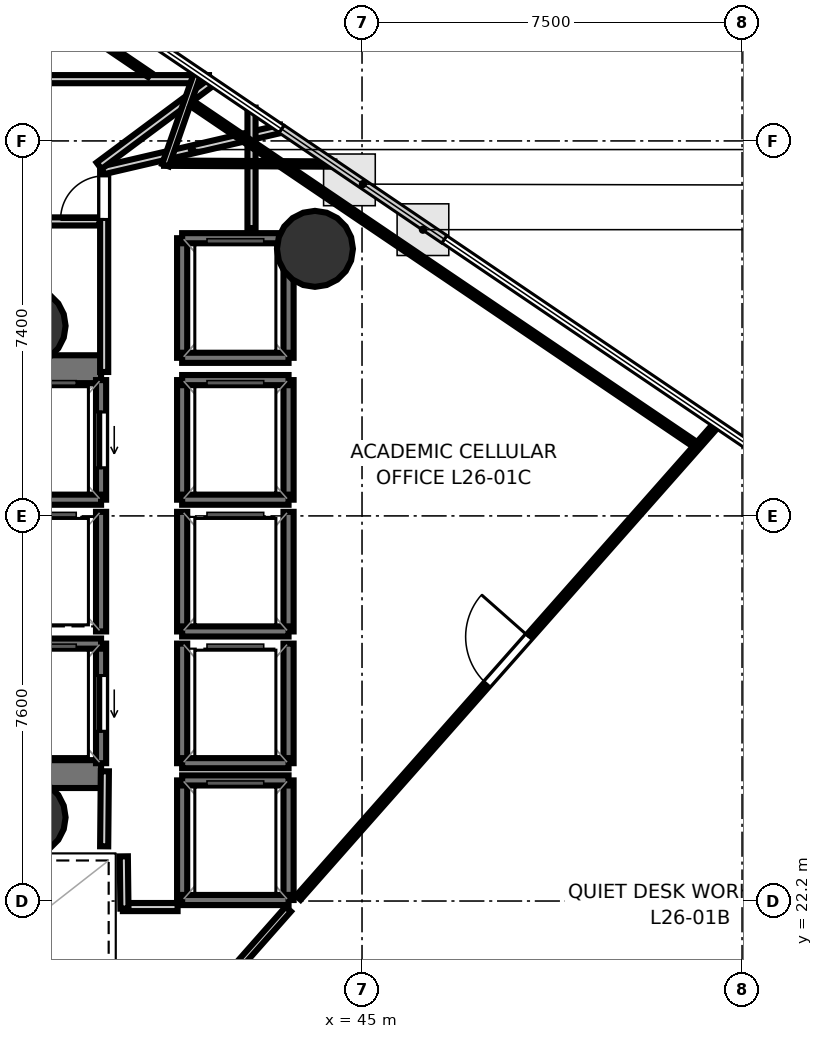
"""IFC4 building model, lengths in metres.
Left out: names, types, materials, properties, quantities, classifications, styles, units other than length and angle.
Written with IfcOpenShell. Run it as: python <this file> out.ifc"""

import sys

from ifc_helpers import new_model, si_unit, direction, frame, frame_2d, origin, origin_2d, place, context, subcontext, project, spatial, rectangle, hollow_circle, extrude, element, fill, save


model = new_model("IFC4")
c1 = context("Model", 3, precision=1e-05, world=origin(), true_north=direction((0.0, 1.0)))
c2 = subcontext(c1, "Body", "Model", "MODEL_VIEW")
j1 = project(units=[si_unit("LENGTHUNIT", "METRE"), si_unit("PLANEANGLEUNIT", "RADIAN")], contexts=[c1])
p1 = place(None, origin())
s1 = spatial("IfcSite", under=j1, at=p1, CompositionType="ELEMENT")
p2 = place(p1, origin())
s2 = spatial("IfcBuilding", under=s1, at=p2, CompositionType="ELEMENT")
p3 = place(p2, frame((0.0, 0.0, 105.2)))
s3 = spatial("IfcBuildingStorey", under=s2, at=p3, CompositionType="ELEMENT", Elevation=105.2)
p4 = place(p3, frame((29.23, 32.695, 0.0), z_axis=(0.0, 0.0, 1.0), x_axis=(1.0, 0.0, 0.0)))
e1 = element("IfcWall", 1, at=p4, inside=s3, PredefinedType="SHEAR", context=c2, shape_type="SweptSolid", body=[
    extrude(rectangle(XDim=10.62, YDim=0.55, at=frame_2d((5.31, 0.0))), origin(), (0.0, 0.0, 1.0), 3.52),
])
p5 = place(p4, frame((0.995, 0.0, 0.0)))
e2 = element("IfcOpeningElement", 2, at=p5, cuts=e1, PredefinedType="OPENING", context=c2, shape_type="SweptSolid", body=[
    extrude(rectangle(XDim=1.25, YDim=2.15, at=frame_2d((0.625, 1.075))), frame((0.0, 0.285, 0.0), z_axis=(0.0, -1.0, 0.0), x_axis=(1.0, 0.0, 0.0)), (0.0, 0.0, 1.0), 0.57),
])
p6 = place(p3, frame((29.23, 24.705, 0.0), z_axis=(0.0, 0.0, 1.0), x_axis=(1.0, 0.0, 0.0)))
e3 = element("IfcWall", 3, at=p6, inside=s3, PredefinedType="SHEAR", context=c2, shape_type="SweptSolid", body=[
    extrude(rectangle(XDim=10.62, YDim=0.55, at=frame_2d((5.31, 0.0))), origin(), (0.0, 0.0, 1.0), 3.52),
])
p7 = place(p6, frame((0.795, 0.0, 0.0)))
e4 = element("IfcOpeningElement", 4, at=p7, cuts=e3, PredefinedType="OPENING", context=c2, shape_type="SweptSolid", body=[
    extrude(rectangle(XDim=1.25, YDim=2.15, at=frame_2d((0.625, 1.075))), frame((0.0, 0.285, 0.0), z_axis=(0.0, -1.0, 0.0), x_axis=(1.0, 0.0, 0.0)), (0.0, 0.0, 1.0), 0.57),
])
for number, where, z_axis, x_axis in (
    (5, (38.4, 33.55, 0.0), (0.0, 0.0, 1.0), (1.0, 0.0, 0.0)),
    (6, (38.4, 23.85, 0.0), (0.0, 0.0, 1.0), (1.0, 0.0, 0.0)),
    (7, (44.071, 35.07, 0.0), (0.0, 0.0, 1.0), (1.0, 0.0, 0.0)),
):
    element("IfcColumn", number, at=place(p3, frame(where, z_axis=z_axis, x_axis=x_axis)), inside=s3, PredefinedType="COLUMN", context=c2, shape_type="SweptSolid", body=[
        extrude(hollow_circle(Radius=0.75, WallThickness=0.036, at=origin_2d()), origin(), (0.0, 0.0, 1.0), 3.7),
    ])
p8 = place(p3, frame((39.85, 30.12, 0.0), z_axis=(0.0, 0.0, 1.0), x_axis=(0.0, 1.0, 0.0)))
e8 = element("IfcWall", 8, at=p8, inside=s3, PredefinedType="SOLIDWALL", context=c2, shape_type="SweptSolid", body=[
    extrude(rectangle(XDim=2.36, YDim=0.2, at=frame_2d((1.18, 0.0))), origin(), (0.0, 0.0, 1.0), 3.52),
])
p9 = place(p8, frame((0.63, 0.0, 0.0)))
e9 = element("IfcOpeningElement", 9, at=p9, cuts=e8, PredefinedType="OPENING", context=c2, shape_type="SweptSolid", body=[
    extrude(rectangle(XDim=1.1, YDim=2.15, at=frame_2d((0.55, 1.075))), frame((0.0, 0.11, 0.0), z_axis=(0.0, -1.0, 0.0), x_axis=(1.0, 0.0, 0.0)), (0.0, 0.0, 1.0), 0.22),
])
p10 = place(p3, frame((37.75, 30.12, 0.0), z_axis=(0.0, 0.0, 1.0), x_axis=(1.0, 0.0, 0.0)))
e10 = element("IfcWall", 10, at=p10, inside=s3, PredefinedType="SOLIDWALL", context=c2, shape_type="SweptSolid", body=[
    extrude(rectangle(XDim=2.1, YDim=0.2, at=frame_2d((1.05, 0.0))), origin(), (0.0, 0.0, 1.0), 3.52),
])
p11 = place(p3, frame((39.85, 24.92, 0.0), z_axis=(0.0, 0.0, 1.0), x_axis=(0.0, 1.0, 0.0)))
e11 = element("IfcWall", 11, at=p11, inside=s3, PredefinedType="SOLIDWALL", context=c2, shape_type="SweptSolid", body=[
    extrude(rectangle(XDim=2.36, YDim=0.2, at=frame_2d((1.18, 0.0))), origin(), (0.0, 0.0, 1.0), 3.52),
])
p12 = place(p11, frame((0.63, 0.0, 0.0)))
e12 = element("IfcOpeningElement", 12, at=p12, cuts=e11, PredefinedType="OPENING", context=c2, shape_type="SweptSolid", body=[
    extrude(rectangle(XDim=1.1, YDim=2.15, at=frame_2d((0.55, 1.075))), frame((0.0, 0.11, 0.0), z_axis=(0.0, -1.0, 0.0), x_axis=(1.0, 0.0, 0.0)), (0.0, 0.0, 1.0), 0.22),
])
p13 = place(p3, frame((37.75, 27.28, 0.0), z_axis=(0.0, 0.0, 1.0), x_axis=(1.0, 0.0, 0.0)))
e13 = element("IfcWall", 13, at=p13, inside=s3, PredefinedType="SOLIDWALL", context=c2, shape_type="SweptSolid", body=[
    extrude(rectangle(XDim=2.1, YDim=0.2, at=frame_2d((1.05, 0.0))), origin(), (0.0, 0.0, 1.0), 3.52),
])
for number, where, z_axis, x_axis in (
    (14, (43.55, 30.12, 0.0), (0.0, 0.0, 1.0), (0.0, 1.0, 0.0)),
    (15, (41.45, 30.12, 0.0), (0.0, 0.0, 1.0), (0.0, 1.0, 0.0)),
):
    element("IfcWall", number, at=place(p3, frame(where, z_axis=z_axis, x_axis=x_axis)), inside=s3, PredefinedType="SOLIDWALL", context=c2, shape_type="SweptSolid", body=[
        extrude(rectangle(XDim=2.36, YDim=0.2, at=frame_2d((1.18, 0.0))), origin(), (0.0, 0.0, 1.0), 3.52),
    ])
for number, where, z_axis, x_axis in (
    (16, (41.45, 32.48, 0.0), (0.0, 0.0, 1.0), (1.0, 0.0, 0.0)),
    (17, (41.45, 30.12, 0.0), (0.0, 0.0, 1.0), (1.0, 0.0, 0.0)),
):
    element("IfcWall", number, at=place(p3, frame(where, z_axis=z_axis, x_axis=x_axis)), inside=s3, PredefinedType="SOLIDWALL", context=c2, shape_type="SweptSolid", body=[
        extrude(rectangle(XDim=2.1, YDim=0.2, at=frame_2d((1.05, 0.0))), origin(), (0.0, 0.0, 1.0), 3.52),
    ])
for number, where, z_axis, x_axis in (
    (18, (43.55, 27.52, 0.0), (0.0, 0.0, 1.0), (0.0, 1.0, 0.0)),
    (19, (41.45, 27.52, 0.0), (0.0, 0.0, 1.0), (0.0, 1.0, 0.0)),
):
    element("IfcWall", number, at=place(p3, frame(where, z_axis=z_axis, x_axis=x_axis)), inside=s3, PredefinedType="SOLIDWALL", context=c2, shape_type="SweptSolid", body=[
        extrude(rectangle(XDim=2.36, YDim=0.2, at=frame_2d((1.18, 0.0))), origin(), (0.0, 0.0, 1.0), 3.52),
    ])
p14 = place(p3, frame((41.45, 27.52, 0.0), z_axis=(0.0, 0.0, 1.0), x_axis=(1.0, 0.0, 0.0)))
e20 = element("IfcWall", 20, at=p14, inside=s3, PredefinedType="SOLIDWALL", context=c2, shape_type="SweptSolid", body=[
    extrude(rectangle(XDim=2.1, YDim=0.2, at=frame_2d((1.05, 0.0))), origin(), (0.0, 0.0, 1.0), 3.52),
])
for number, where, z_axis, x_axis in (
    (21, (43.55, 24.92, 0.0), (0.0, 0.0, 1.0), (0.0, 1.0, 0.0)),
    (22, (41.45, 24.92, 0.0), (0.0, 0.0, 1.0), (0.0, 1.0, 0.0)),
):
    element("IfcWall", number, at=place(p3, frame(where, z_axis=z_axis, x_axis=x_axis)), inside=s3, PredefinedType="SOLIDWALL", context=c2, shape_type="SweptSolid", body=[
        extrude(rectangle(XDim=2.36, YDim=0.2, at=frame_2d((1.18, 0.0))), origin(), (0.0, 0.0, 1.0), 3.52),
    ])
p15 = place(p3, frame((41.45, 24.92, 0.0), z_axis=(0.0, 0.0, 1.0), x_axis=(1.0, 0.0, 0.0)))
e23 = element("IfcWall", 23, at=p15, inside=s3, PredefinedType="SOLIDWALL", context=c2, shape_type="SweptSolid", body=[
    extrude(rectangle(XDim=2.1, YDim=0.2, at=frame_2d((1.05, 0.0))), origin(), (0.0, 0.0, 1.0), 3.52),
])
p16 = place(p3, frame((39.85, 27.52, 0.0), z_axis=(0.0, 0.0, 1.0), x_axis=(0.0, 1.0, 0.0)))
e24 = element("IfcWall", 24, at=p16, inside=s3, PredefinedType="SOLIDWALL", context=c2, shape_type="SweptSolid", body=[
    extrude(rectangle(XDim=2.36, YDim=0.2, at=frame_2d((1.18, 0.0))), origin(), (0.0, 0.0, 1.0), 3.52),
])
for number, where, z_axis, x_axis in (
    (25, (43.55, 22.22, 0.0), (0.0, 0.0, 1.0), (0.0, 1.0, 0.0)),
    (26, (41.45, 22.22, 0.0), (0.0, 0.0, 1.0), (0.0, 1.0, 0.0)),
):
    element("IfcWall", number, at=place(p3, frame(where, z_axis=z_axis, x_axis=x_axis)), inside=s3, PredefinedType="SOLIDWALL", context=c2, shape_type="SweptSolid", body=[
        extrude(rectangle(XDim=2.36, YDim=0.2, at=frame_2d((1.18, 0.0))), origin(), (0.0, 0.0, 1.0), 3.52),
    ])
for number, where, z_axis, x_axis in (
    (27, (41.45, 24.58, 0.0), (0.0, 0.0, 1.0), (1.0, 0.0, 0.0)),
    (28, (41.45, 22.22, 0.0), (0.0, 0.0, 1.0), (1.0, 0.0, 0.0)),
):
    element("IfcWall", number, at=place(p3, frame(where, z_axis=z_axis, x_axis=x_axis)), inside=s3, PredefinedType="SOLIDWALL", context=c2, shape_type="SweptSolid", body=[
        extrude(rectangle(XDim=2.1, YDim=0.2, at=frame_2d((1.05, 0.0))), origin(), (0.0, 0.0, 1.0), 3.52),
    ])
for number, where, z_axis, x_axis in (
    (29, (43.55, 32.92, 0.0), (0.0, 0.0, 1.0), (0.0, 1.0, 0.0)),
    (30, (41.45, 32.92, 0.0), (0.0, 0.0, 1.0), (0.0, 1.0, 0.0)),
):
    element("IfcWall", number, at=place(p3, frame(where, z_axis=z_axis, x_axis=x_axis)), inside=s3, PredefinedType="SOLIDWALL", context=c2, shape_type="SweptSolid", body=[
        extrude(rectangle(XDim=2.36, YDim=0.2, at=frame_2d((1.18, 0.0))), origin(), (0.0, 0.0, 1.0), 3.52),
    ])
for number, where, z_axis, x_axis in (
    (31, (41.45, 35.28, 0.0), (0.0, 0.0, 1.0), (1.0, 0.0, 0.0)),
    (32, (41.45, 32.92, 0.0), (0.0, 0.0, 1.0), (1.0, 0.0, 0.0)),
):
    element("IfcWall", number, at=place(p3, frame(where, z_axis=z_axis, x_axis=x_axis)), inside=s3, PredefinedType="SOLIDWALL", context=c2, shape_type="SweptSolid", body=[
        extrude(rectangle(XDim=2.1, YDim=0.2, at=frame_2d((1.05, 0.0))), origin(), (0.0, 0.0, 1.0), 3.52),
    ])
p17 = place(p3, frame((39.911, 32.64, 0.0), z_axis=(0.0, 0.0, 1.0), x_axis=(0.0, 1.0, 0.0)))
e33 = element("IfcWall", 33, at=p17, inside=s3, PredefinedType="PARTITIONING", context=c2, shape_type="SweptSolid", body=[
    extrude(rectangle(XDim=4.01, YDim=0.16, at=frame_2d((2.005, 0.0))), origin(), (0.0, 0.0, 1.0), 2.84),
])
p18 = place(p17, frame((3.01, 0.0, 0.0)))
e34 = element("IfcOpeningElement", 34, at=p18, cuts=e33, PredefinedType="OPENING", context=c2, shape_type="SweptSolid", body=[
    extrude(rectangle(XDim=0.86, YDim=2.05, at=frame_2d((0.43, 1.025))), frame((0.0, 0.09, 0.0), z_axis=(0.0, -1.0, 0.0), x_axis=(1.0, 0.0, 0.0)), (0.0, 0.0, 1.0), 0.18),
])
p19 = place(p3, frame((39.88, 36.619, 0.0), z_axis=(0.0, 0.0, 1.0), x_axis=(0.973960950435, 0.2267158288, 0.0)))
e35 = element("IfcWall", 35, at=p19, inside=s3, PredefinedType="PARTITIONING", context=c2, shape_type="SweptSolid", body=[
    extrude(rectangle(XDim=3.62, YDim=0.16, at=frame_2d((1.81, 0.0))), origin(), (0.0, 0.0, 1.0), 2.84),
])
p20 = place(p3, frame((42.819, 37.857, 0.0), z_axis=(0.0, 0.0, 1.0), x_axis=(0.0, -1.0, 0.0)))
e36 = element("IfcWall", 36, at=p20, inside=s3, PredefinedType="PARTITIONING", context=c2, shape_type="SweptSolid", body=[
    extrude(rectangle(XDim=2.377, YDim=0.16, at=frame_2d((1.188, 0.0))), origin(), (0.0, 0.0, 1.0), 2.84),
])
p21 = place(p3, frame((41.36, 22.081, 0.0), z_axis=(0.0, 0.0, 1.0), x_axis=(-1.0, 0.0, 0.0)))
e37 = element("IfcWall", 37, at=p21, inside=s3, PredefinedType="PARTITIONING", context=c2, shape_type="SweptSolid", body=[
    extrude(rectangle(XDim=1.08, YDim=0.16, at=frame_2d((0.54, 0.0))), origin(), (0.0, 0.0, 1.0), 2.84),
])
p22 = place(p3, frame((40.311, 22.05, 0.0), z_axis=(0.0, 0.0, 1.0), x_axis=(-0.011836292006, 0.999929948642, 0.0)))
e38 = element("IfcWall", 38, at=p22, inside=s3, PredefinedType="PARTITIONING", context=c2, shape_type="SweptSolid", body=[
    extrude(rectangle(XDim=1.031, YDim=0.16, at=frame_2d((0.516, 0.0))), origin(), (0.0, 0.0, 1.0), 2.84),
])
p23 = place(p3, frame((39.911, 23.28, 0.0), z_axis=(0.0, 0.0, 1.0), x_axis=(0.009397771291, 0.999955839972, 0.0)))
e39 = element("IfcWall", 39, at=p23, inside=s3, PredefinedType="PARTITIONING", context=c2, shape_type="SweptSolid", body=[
    extrude(rectangle(XDim=1.481, YDim=0.16, at=frame_2d((0.74, 0.0))), origin(), (0.0, 0.0, 1.0), 2.84),
])
p24 = place(p3, frame((26.42, 38.419, 0.0), z_axis=(0.0, 0.0, 1.0), x_axis=(1.0, 0.0, 0.0)))
e40 = element("IfcWall", 40, at=p24, inside=s3, PredefinedType="PARTITIONING", context=c2, shape_type="SweptSolid", body=[
    extrude(rectangle(XDim=15.56, YDim=0.16, at=frame_2d((7.78, 0.0))), origin(), (0.0, 0.0, 1.0), 2.84),
])
p25 = place(p24, frame((10.865, 0.0, 0.0)))
e41 = element("IfcOpeningElement", 41, at=p25, cuts=e40, PredefinedType="OPENING", context=c2, shape_type="SweptSolid", body=[
    extrude(rectangle(XDim=1.25, YDim=2.2, at=frame_2d((0.625, 1.1))), frame((0.0, 0.09, 0.0), z_axis=(0.0, -1.0, 0.0), x_axis=(1.0, 0.0, 0.0)), (0.0, 0.0, 1.0), 0.18),
])
p26 = place(p24, frame((5.532, 0.0, 0.0)))
e42 = element("IfcOpeningElement", 42, at=p26, cuts=e40, PredefinedType="OPENING", context=c2, shape_type="SweptSolid", body=[
    extrude(rectangle(XDim=1.25, YDim=2.2, at=frame_2d((0.625, 1.1))), frame((0.0, 0.09, 0.0), z_axis=(0.0, -1.0, 0.0), x_axis=(1.0, 0.0, 0.0)), (0.0, 0.0, 1.0), 0.18),
])
p27 = place(p3, frame((42.053, 38.379, 0.0), z_axis=(0.0, 0.0, 1.0), x_axis=(-0.802246834953, -0.596992475504, 0.0)))
e43 = element("IfcWall", 43, at=p27, inside=s3, PredefinedType="PARTITIONING", context=c2, shape_type="SweptSolid", body=[
    extrude(rectangle(XDim=2.796, YDim=0.16, at=frame_2d((1.398, 0.0))), origin(), (0.0, 0.0, 1.0), 2.84),
])
p28 = place(p3, frame((39.818, 35.611, 0.0), z_axis=(0.0, 0.0, 1.0), x_axis=(-1.0, 0.0, 0.0)))
e44 = element("IfcWall", 44, at=p28, inside=s3, PredefinedType="PARTITIONING", context=c2, shape_type="SweptSolid", body=[
    extrude(rectangle(XDim=2.768, YDim=0.16, at=frame_2d((1.384, 0.0))), origin(), (0.0, 0.0, 1.0), 2.84),
])
p29 = place(p3, frame((40.303, 18.372, 0.0), z_axis=(0.0, 0.0, 1.0), x_axis=(0.662221894186, 0.749307789136, 0.0)))
e45 = element("IfcWall", 45, at=p29, inside=s3, PredefinedType="PARTITIONING", context=c2, shape_type="SweptSolid", body=[
    extrude(rectangle(XDim=4.895, YDim=0.14, at=frame_2d((2.447, 0.0))), origin(), (0.0, 0.0, 1.0), 2.84),
])
p30 = place(p3, frame((43.743, 22.264, 0.0), z_axis=(0.0, 0.0, 1.0), x_axis=(0.662202897959, 0.749324577159, 0.0)))
e46 = element("IfcWall", 46, at=p30, inside=s3, PredefinedType="PARTITIONING", context=c2, shape_type="SweptSolid", body=[
    extrude(rectangle(XDim=12.498, YDim=0.12, at=frame_2d((6.249, 0.0))), origin(), (0.0, 0.0, 1.0), 2.84),
])
p31 = place(p30, frame((5.624, 0.0, 0.0)))
e47 = element("IfcOpeningElement", 47, at=p31, cuts=e46, PredefinedType="OPENING", context=c2, shape_type="SweptSolid", body=[
    extrude(rectangle(XDim=1.25, YDim=2.2, at=frame_2d((0.625, 1.1))), frame((0.0, 0.07, 0.0), z_axis=(0.0, -1.0, 0.0), x_axis=(1.0, 0.0, 0.0)), (0.0, 0.0, 1.0), 0.14),
])
p32 = place(p3, frame((44.454, 36.743, 0.0), z_axis=(0.0, 0.0, 1.0), x_axis=(-0.999986322379, 0.005230205958, 0.0)))
e48 = element("IfcWall", 48, at=p32, inside=s3, PredefinedType="PARTITIONING", context=c2, shape_type="SweptSolid", body=[
    extrude(rectangle(XDim=3.361, YDim=0.105, at=frame_2d((1.68, 0.0))), origin(), (0.0, 0.0, 1.0), 2.84),
])
p33 = place(p3, frame((41.122, 36.72, 0.0), z_axis=(0.0, 0.0, 1.0), x_axis=(0.329225111587, 0.944251463277, 0.0)))
e49 = element("IfcWall", 49, at=p33, inside=s3, PredefinedType="PARTITIONING", context=c2, shape_type="SweptSolid", body=[
    extrude(rectangle(XDim=1.962, YDim=0.14, at=frame_2d((0.981, 0.0))), origin(), (0.0, 0.0, 1.0), 2.84),
])
p34 = place(p3, frame((41.65, 37.933, 0.0), z_axis=(0.0, 0.0, 1.0), x_axis=(0.827941747022, -0.560814107827, 0.0)))
e50 = element("IfcWall", 50, at=p34, inside=s3, PredefinedType="PARTITIONING", context=c2, shape_type="SweptSolid", body=[
    extrude(rectangle(XDim=11.895, YDim=0.12, at=frame_2d((5.948, 0.0))), origin(), (0.0, 0.0, 1.0), 2.84),
])
p35 = place(p3, frame((34.052, 43.08, 0.0), z_axis=(0.0, 0.0, 1.0), x_axis=(0.827934826591, -0.560824324471, 0.0)))
e51 = element("IfcWall", 51, at=p35, inside=s3, PredefinedType="PARTITIONING", context=c2, shape_type="SweptSolid", body=[
    extrude(rectangle(XDim=8.158, YDim=0.105, at=frame_2d((4.079, 0.0))), origin(), (0.0, 0.0, 1.0), 2.84),
])
p36 = place(p9, origin())
e52 = element("IfcDoor", 52, at=p36, inside=s3, OperationType="SLIDING_TO_LEFT", PredefinedType="DOOR", context=c2, shape_type="SweptSolid", body=[
    extrude(rectangle(XDim=1.1, YDim=2.15, at=frame_2d((0.55, 1.075))), frame((0.0, 0.025, 0.0), z_axis=(0.0, -1.0, 0.0), x_axis=(1.0, 0.0, 0.0)), (0.0, 0.0, 1.0), 0.05),
])
fill(e9, e52)
p37 = place(p12, origin())
e53 = element("IfcDoor", 53, at=p37, inside=s3, OperationType="SLIDING_TO_LEFT", PredefinedType="DOOR", context=c2, shape_type="SweptSolid", body=[
    extrude(rectangle(XDim=1.1, YDim=2.15, at=frame_2d((0.55, 1.075))), frame((0.0, 0.025, 0.0), z_axis=(0.0, -1.0, 0.0), x_axis=(1.0, 0.0, 0.0)), (0.0, 0.0, 1.0), 0.05),
])
fill(e12, e53)
p38 = place(p18, origin())
e54 = element("IfcDoor", 54, at=p38, inside=s3, OperationType="SINGLE_SWING_LEFT", PredefinedType="DOOR", context=c2, shape_type="SweptSolid", body=[
    extrude(rectangle(XDim=0.86, YDim=2.05, at=frame_2d((0.43, 1.025))), frame((0.0, 0.025, 0.0), z_axis=(0.0, -1.0, 0.0), x_axis=(1.0, 0.0, 0.0)), (0.0, 0.0, 1.0), 0.05),
])
fill(e34, e54)
p39 = place(p31, origin())
e55 = element("IfcDoor", 55, at=p39, inside=s3, OperationType="SINGLE_SWING_RIGHT", PredefinedType="DOOR", context=c2, shape_type="SweptSolid", body=[
    extrude(rectangle(XDim=1.25, YDim=2.2, at=frame_2d((0.625, 1.1))), frame((0.0, 0.025, 0.0), z_axis=(0.0, -1.0, 0.0), x_axis=(1.0, 0.0, 0.0)), (0.0, 0.0, 1.0), 0.05),
])
fill(e47, e55)
save(model, sys.argv[1])
